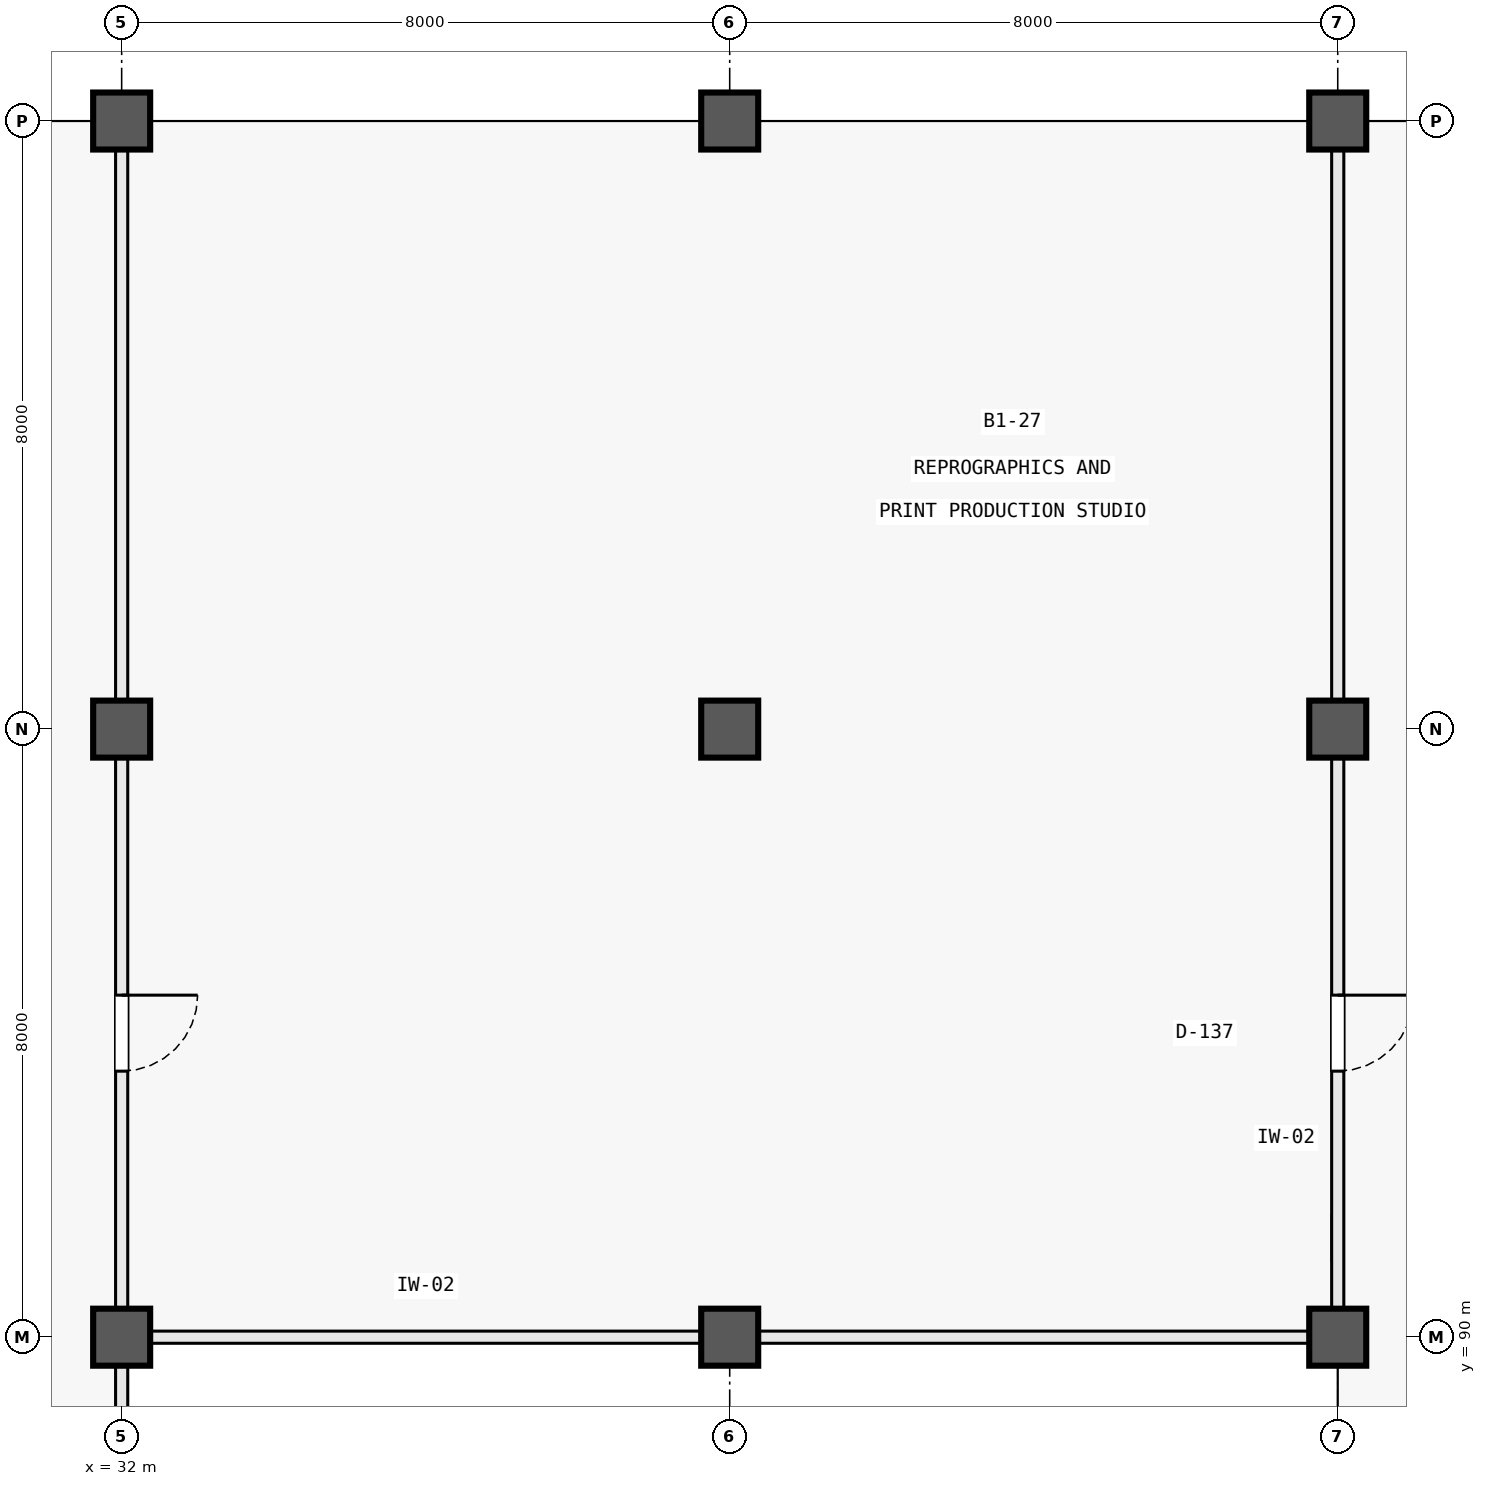
"""IFC4 building model, lengths in metres.
Left out: names, types, materials, properties, quantities, classifications, styles, units other than length and angle.
Written with IfcOpenShell. Run it as: python <this file> out.ifc"""

import sys

from ifc_helpers import new_model, si_unit, direction, frame, frame_2d, origin, origin_2d, place, context, subcontext, project, spatial, rectangle, extrude, element, fill, save


model = new_model("IFC4")
c1 = context("Model", 3, precision=1e-05, world=origin(), true_north=direction((0.0, 1.0)))
c2 = subcontext(c1, "Body", "Model", "MODEL_VIEW")
j1 = project(units=[si_unit("LENGTHUNIT", "METRE"), si_unit("PLANEANGLEUNIT", "RADIAN")], contexts=[c1])
p1 = place(None, origin())
s1 = spatial("IfcSite", under=j1, at=p1, CompositionType="ELEMENT")
p2 = place(p1, origin())
s2 = spatial("IfcBuilding", under=s1, at=p2, CompositionType="ELEMENT")
p3 = place(p2, frame((0.0, 0.0, -5.4)))
s3 = spatial("IfcBuildingStorey", under=s2, at=p3, CompositionType="ELEMENT", Elevation=-5.4)
for number, where, z_axis, x_axis in (
    (1, (32.0, 90.0, 0.0), (0.0, 0.0, 1.0), (1.0, 0.0, 0.0)),
    (2, (32.0, 98.0, 0.0), (0.0, 0.0, 1.0), (1.0, 0.0, 0.0)),
    (3, (32.0, 106.0, 0.0), (0.0, 0.0, 1.0), (1.0, 0.0, 0.0)),
    (4, (40.0, 90.0, 0.0), (0.0, 0.0, 1.0), (1.0, 0.0, 0.0)),
    (5, (40.0, 98.0, 0.0), (0.0, 0.0, 1.0), (1.0, 0.0, 0.0)),
    (6, (40.0, 106.0, 0.0), (0.0, 0.0, 1.0), (1.0, 0.0, 0.0)),
    (7, (48.0, 90.0, 0.0), (0.0, 0.0, 1.0), (1.0, 0.0, 0.0)),
    (8, (48.0, 98.0, 0.0), (0.0, 0.0, 1.0), (1.0, 0.0, 0.0)),
    (9, (48.0, 106.0, 0.0), (0.0, 0.0, 1.0), (1.0, 0.0, 0.0)),
):
    element("IfcColumn", number, at=place(p3, frame(where, z_axis=z_axis, x_axis=x_axis)), inside=s3, PredefinedType="COLUMN", context=c2, shape_type="SweptSolid", body=[
        extrude(rectangle(XDim=0.75, YDim=0.75, at=origin_2d()), origin(), (0.0, 0.0, 1.0), 5.4),
    ])
p4 = place(p3, frame((32.0, 82.385, 0.0), z_axis=(0.0, 0.0, 1.0), x_axis=(0.0, 1.0, 0.0)))
e10 = element("IfcWall", 10, at=p4, inside=s3, PredefinedType="PARTITIONING", context=c2, shape_type="SweptSolid", body=[
    extrude(rectangle(XDim=7.23, YDim=0.16, at=frame_2d((3.615, 0.0))), origin(), (0.0, 0.0, 1.0), 3.83),
])
p5 = place(p3, frame((32.0, 90.385, 0.0), z_axis=(0.0, 0.0, 1.0), x_axis=(0.0, 1.0, 0.0)))
e11 = element("IfcWall", 11, at=p5, inside=s3, PredefinedType="PARTITIONING", context=c2, shape_type="SweptSolid", body=[
    extrude(rectangle(XDim=7.23, YDim=0.16, at=frame_2d((3.615, 0.0))), origin(), (0.0, 0.0, 1.0), 3.83),
])
p6 = place(p5, frame((3.115, 0.0, 0.0)))
e12 = element("IfcOpeningElement", 12, at=p6, cuts=e11, PredefinedType="OPENING", context=c2, shape_type="SweptSolid", body=[
    extrude(rectangle(XDim=1.0, YDim=2.15, at=frame_2d((0.5, 1.075))), frame((0.0, 0.092, 0.0), z_axis=(0.0, -1.0, 0.0), x_axis=(1.0, 0.0, 0.0)), (0.0, 0.0, 1.0), 0.184),
])
for number, where, z_axis, x_axis in (
    (13, (32.0, 98.385, 0.0), (0.0, 0.0, 1.0), (0.0, 1.0, 0.0)),
    (14, (32.385, 90.0, 0.0), (0.0, 0.0, 1.0), (1.0, 0.0, 0.0)),
    (15, (40.385, 90.0, 0.0), (0.0, 0.0, 1.0), (1.0, 0.0, 0.0)),
):
    element("IfcWall", number, at=place(p3, frame(where, z_axis=z_axis, x_axis=x_axis)), inside=s3, PredefinedType="PARTITIONING", context=c2, shape_type="SweptSolid", body=[
        extrude(rectangle(XDim=7.23, YDim=0.16, at=frame_2d((3.615, 0.0))), origin(), (0.0, 0.0, 1.0), 3.83),
    ])
p7 = place(p3, frame((48.0, 90.385, 0.0), z_axis=(0.0, 0.0, 1.0), x_axis=(0.0, 1.0, 0.0)))
e16 = element("IfcWall", 16, at=p7, inside=s3, PredefinedType="PARTITIONING", context=c2, shape_type="SweptSolid", body=[
    extrude(rectangle(XDim=7.23, YDim=0.16, at=frame_2d((3.615, 0.0))), origin(), (0.0, 0.0, 1.0), 3.83),
])
p8 = place(p7, frame((3.115, 0.0, 0.0)))
e17 = element("IfcOpeningElement", 17, at=p8, cuts=e16, PredefinedType="OPENING", context=c2, shape_type="SweptSolid", body=[
    extrude(rectangle(XDim=1.0, YDim=2.15, at=frame_2d((0.5, 1.075))), frame((0.0, 0.092, 0.0), z_axis=(0.0, -1.0, 0.0), x_axis=(1.0, 0.0, 0.0)), (0.0, 0.0, 1.0), 0.184),
])
p9 = place(p3, frame((48.0, 98.385, 0.0), z_axis=(0.0, 0.0, 1.0), x_axis=(0.0, 1.0, 0.0)))
e18 = element("IfcWall", 18, at=p9, inside=s3, PredefinedType="PARTITIONING", context=c2, shape_type="SweptSolid", body=[
    extrude(rectangle(XDim=7.23, YDim=0.16, at=frame_2d((3.615, 0.0))), origin(), (0.0, 0.0, 1.0), 3.83),
])
p10 = place(p6, frame((1.0, 0.0, 0.0), z_axis=(0.0, 0.0, 1.0), x_axis=(-1.0, 0.0, 0.0)))
e19 = element("IfcDoor", 19, at=p10, inside=s3, OperationType="SINGLE_SWING_RIGHT", PredefinedType="DOOR", context=c2, shape_type="SweptSolid", body=[
    extrude(rectangle(XDim=1.0, YDim=2.15, at=frame_2d((0.5, 1.075))), frame((0.0, 0.025, 0.0), z_axis=(0.0, -1.0, 0.0), x_axis=(1.0, 0.0, 0.0)), (0.0, 0.0, 1.0), 0.05),
])
fill(e12, e19)
p11 = place(p8, frame((1.0, 0.0, 0.0), z_axis=(0.0, 0.0, 1.0), x_axis=(-1.0, 0.0, 0.0)))
e20 = element("IfcDoor", 20, at=p11, inside=s3, OperationType="SINGLE_SWING_RIGHT", PredefinedType="DOOR", context=c2, shape_type="SweptSolid", body=[
    extrude(rectangle(XDim=1.0, YDim=2.15, at=frame_2d((0.5, 1.075))), frame((0.0, 0.025, 0.0), z_axis=(0.0, -1.0, 0.0), x_axis=(1.0, 0.0, 0.0)), (0.0, 0.0, 1.0), 0.05),
])
fill(e17, e20)
save(model, sys.argv[1])
